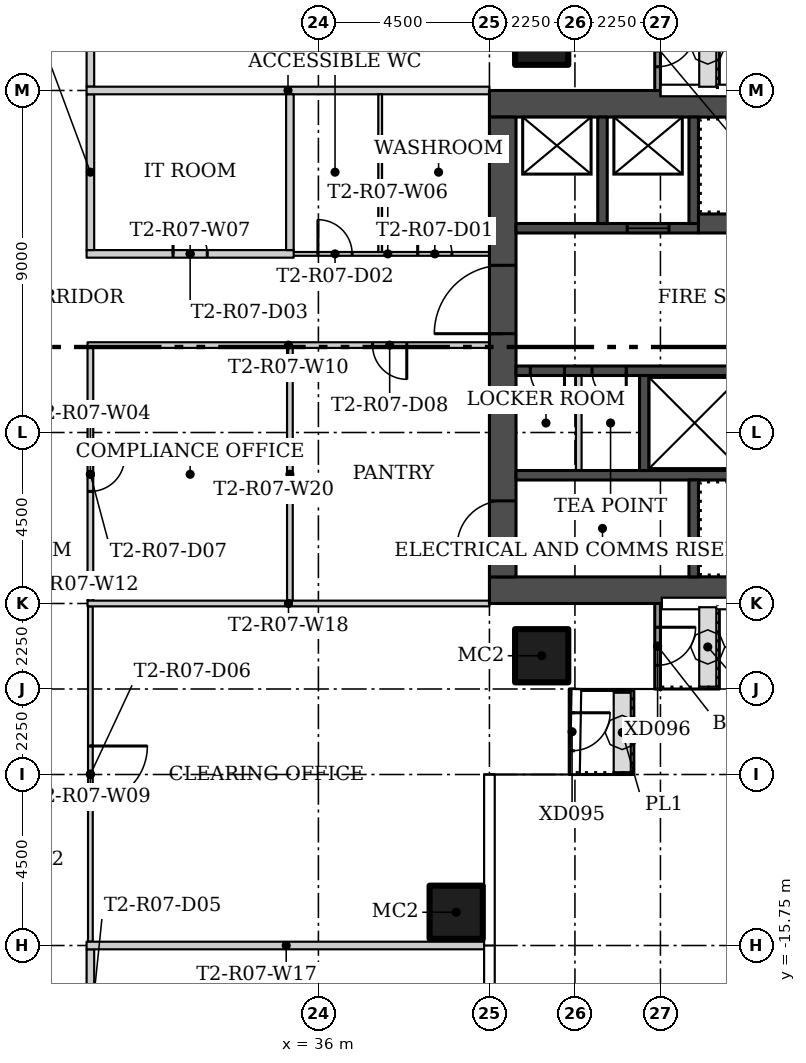
"""IFC4 building model, lengths in metres.
Left out: names, types, materials, properties, quantities, classifications, styles, units other than length and angle.
Written with IfcOpenShell. Run it as: python <this file> out.ifc"""

import sys

from ifc_helpers import new_model, si_unit, direction, frame, frame_2d, origin, origin_2d, place, context, subcontext, project, spatial, rectangle, hollow_rectangle, extrude, element, fill, save


model = new_model("IFC4")
c1 = context("Model", 3, precision=1e-05, world=origin(), true_north=direction((0.0, 1.0)))
c2 = subcontext(c1, "Body", "Model", "MODEL_VIEW")
j1 = project(units=[si_unit("LENGTHUNIT", "METRE"), si_unit("PLANEANGLEUNIT", "RADIAN")], contexts=[c1])
p1 = place(None, origin())
s1 = spatial("IfcSite", under=j1, at=p1, CompositionType="ELEMENT")
p2 = place(p1, origin())
s2 = spatial("IfcBuilding", under=s1, at=p2, CompositionType="ELEMENT")
p3 = place(p2, frame((0.0, 0.0, 69.3)))
s3 = spatial("IfcBuildingStorey", under=s2, at=p3, CompositionType="ELEMENT", Elevation=69.3)
for number, where in (
    (1, (41.875, 8.125, 0.0)),
    (2, (41.875, -8.125, 0.0)),
    (3, (39.625, -14.875, 0.0)),
):
    element("IfcColumn", number, at=place(p3, frame(where)), inside=s3, PredefinedType="COLUMN", context=c2, shape_type="SweptSolid", body=[
        extrude(hollow_rectangle(XDim=1.4, YDim=1.4, WallThickness=0.05, at=origin_2d()), origin(), (0.0, 0.0, 1.0), 3.55),
    ])
p4 = place(p3, frame((30.0, -15.85, 0.0), z_axis=(0.0, 0.0, 1.0), x_axis=(0.0, -1.0, 0.0)))
e4 = element("IfcWall", 4, at=p4, inside=s3, PredefinedType="PARTITIONING", context=c2, shape_type="SweptSolid", body=[
    extrude(rectangle(XDim=4.3, YDim=0.2, at=frame_2d((2.15, 0.0))), origin(), (0.0, 0.0, 1.0), 3.55),
])
p5 = place(p4, frame((1.4, 0.0, 0.0)))
e5 = element("IfcOpeningElement", 5, at=p5, cuts=e4, PredefinedType="OPENING", context=c2, shape_type="SweptSolid", body=[
    extrude(rectangle(XDim=1.5, YDim=2.1, at=frame_2d((0.75, 1.05))), frame((0.0, 0.11, 0.0), z_axis=(0.0, -1.0, 0.0), x_axis=(1.0, 0.0, 0.0)), (0.0, 0.0, 1.0), 0.22),
])
p6 = place(p3, frame((30.0, 20.15, 0.0), z_axis=(0.0, 0.0, 1.0), x_axis=(0.0, -1.0, 0.0)))
e6 = element("IfcWall", 6, at=p6, inside=s3, PredefinedType="PARTITIONING", context=c2, shape_type="SweptSolid", body=[
    extrude(rectangle(XDim=13.3, YDim=0.2, at=frame_2d((6.65, 0.0))), origin(), (0.0, 0.0, 1.0), 3.55),
])
p7 = place(p6, frame((5.9, 0.0, 0.0)))
e7 = element("IfcOpeningElement", 7, at=p7, cuts=e6, PredefinedType="OPENING", context=c2, shape_type="SweptSolid", body=[
    extrude(rectangle(XDim=1.5, YDim=2.1, at=frame_2d((0.75, 1.05))), frame((0.0, 0.11, 0.0), z_axis=(0.0, -1.0, 0.0), x_axis=(1.0, 0.0, 0.0)), (0.0, 0.0, 1.0), 0.22),
])
p8 = place(p3, frame((30.0, -0.025, 0.0), z_axis=(0.0, 0.0, 1.0), x_axis=(0.0, -1.0, 0.0)))
e8 = element("IfcWall", 8, at=p8, inside=s3, PredefinedType="PARTITIONING", context=c2, shape_type="SweptSolid", body=[
    extrude(rectangle(XDim=6.65, YDim=0.15, at=frame_2d((3.325, 0.0))), origin(), (0.0, 0.0, 1.0), 3.55),
])
p9 = place(p8, frame((2.875, 0.0, 0.0)))
e9 = element("IfcOpeningElement", 9, at=p9, cuts=e8, PredefinedType="OPENING", context=c2, shape_type="SweptSolid", body=[
    extrude(rectangle(XDim=0.9, YDim=2.1, at=frame_2d((0.45, 1.05))), frame((0.0, 0.085, 0.0), z_axis=(0.0, -1.0, 0.0), x_axis=(1.0, 0.0, 0.0)), (0.0, 0.0, 1.0), 0.17),
])
p10 = place(p3, frame((35.15, 2.45, 0.0)))
e10 = element("IfcWall", 10, at=p10, inside=s3, PredefinedType="PARTITIONING", context=c2, shape_type="SweptSolid", body=[
    extrude(rectangle(XDim=5.35, YDim=0.1, at=frame_2d((2.675, 0.0))), origin(), (0.0, 0.0, 1.0), 3.55),
])
p11 = place(p10, frame((3.462, 0.0, 0.0)))
e11 = element("IfcOpeningElement", 11, at=p11, cuts=e10, PredefinedType="OPENING", context=c2, shape_type="SweptSolid", body=[
    extrude(rectangle(XDim=0.9, YDim=2.1, at=frame_2d((0.45, 1.05))), frame((0.0, 0.06, 0.0), z_axis=(0.0, -1.0, 0.0), x_axis=(1.0, 0.0, 0.0)), (0.0, 0.0, 1.0), 0.12),
])
p12 = place(p10, frame((0.837, 0.0, 0.0)))
e12 = element("IfcOpeningElement", 12, at=p12, cuts=e10, PredefinedType="OPENING", context=c2, shape_type="SweptSolid", body=[
    extrude(rectangle(XDim=0.9, YDim=2.1, at=frame_2d((0.45, 1.05))), frame((0.0, 0.06, 0.0), z_axis=(0.0, -1.0, 0.0), x_axis=(1.0, 0.0, 0.0)), (0.0, 0.0, 1.0), 0.12),
])
p13 = place(p3, frame((29.9, 2.45, 0.0)))
e13 = element("IfcWall", 13, at=p13, inside=s3, PredefinedType="PARTITIONING", context=c2, shape_type="SweptSolid", body=[
    extrude(rectangle(XDim=5.45, YDim=0.2, at=frame_2d((2.725, 0.0))), origin(), (0.0, 0.0, 1.0), 3.55),
])
p14 = place(p13, frame((2.275, 0.0, 0.0)))
e14 = element("IfcOpeningElement", 14, at=p14, cuts=e13, PredefinedType="OPENING", context=c2, shape_type="SweptSolid", body=[
    extrude(rectangle(XDim=0.9, YDim=2.1, at=frame_2d((0.45, 1.05))), frame((0.0, 0.11, 0.0), z_axis=(0.0, -1.0, 0.0), x_axis=(1.0, 0.0, 0.0)), (0.0, 0.0, 1.0), 0.22),
])
p15 = place(p3, frame((30.0, 6.65, 0.0), z_axis=(0.0, 0.0, 1.0), x_axis=(0.0, -1.0, 0.0)))
e15 = element("IfcWall", 15, at=p15, inside=s3, PredefinedType="PARTITIONING", context=c2, shape_type="SweptSolid", body=[
    extrude(rectangle(XDim=4.1, YDim=0.2, at=frame_2d((2.05, 0.0))), origin(), (0.0, 0.0, 1.0), 3.55),
])
p16 = place(p3, frame((30.0, -6.825, 0.0), z_axis=(0.0, 0.0, 1.0), x_axis=(0.0, -1.0, 0.0)))
e16 = element("IfcWall", 16, at=p16, inside=s3, PredefinedType="PARTITIONING", context=c2, shape_type="SweptSolid", body=[
    extrude(rectangle(XDim=8.825, YDim=0.125, at=frame_2d((4.413, 0.0))), origin(), (0.0, 0.0, 1.0), 3.55),
])
p17 = place(p16, frame((3.675, 0.0, 0.0)))
e17 = element("IfcOpeningElement", 17, at=p17, cuts=e16, PredefinedType="OPENING", context=c2, shape_type="SweptSolid", body=[
    extrude(rectangle(XDim=1.5, YDim=2.1, at=frame_2d((0.75, 1.05))), frame((0.0, 0.073, 0.0), z_axis=(0.0, -1.0, 0.0), x_axis=(1.0, 0.0, 0.0)), (0.0, 0.0, 1.0), 0.145),
])
p18 = place(p3, frame((40.5, 0.05, 0.0), z_axis=(0.0, 0.0, 1.0), x_axis=(-1.0, 0.0, 0.0)))
e18 = element("IfcWall", 18, at=p18, inside=s3, PredefinedType="PARTITIONING", context=c2, shape_type="SweptSolid", body=[
    extrude(rectangle(XDim=10.575, YDim=0.15, at=frame_2d((5.288, 0.0))), origin(), (0.0, 0.0, 1.0), 3.55),
])
p19 = place(p18, frame((2.175, 0.0, 0.0)))
e19 = element("IfcOpeningElement", 19, at=p19, cuts=e18, PredefinedType="OPENING", context=c2, shape_type="SweptSolid", body=[
    extrude(rectangle(XDim=0.9, YDim=2.1, at=frame_2d((0.45, 1.05))), frame((0.0, 0.085, 0.0), z_axis=(0.0, -1.0, 0.0), x_axis=(1.0, 0.0, 0.0)), (0.0, 0.0, 1.0), 0.17),
])
p20 = place(p3, frame((29.9, 6.75, 0.0)))
e20 = element("IfcWall", 20, at=p20, inside=s3, PredefinedType="PARTITIONING", context=c2, shape_type="SweptSolid", body=[
    extrude(rectangle(XDim=10.6, YDim=0.2, at=frame_2d((5.3, 0.0))), origin(), (0.0, 0.0, 1.0), 3.55),
])
p21 = place(p3, frame((37.625, 6.65, 0.0), z_axis=(0.0, 0.0, 1.0), x_axis=(0.0, -1.0, 0.0)))
e21 = element("IfcWall", 21, at=p21, inside=s3, PredefinedType="PARTITIONING", context=c2, shape_type="SweptSolid", body=[
    extrude(rectangle(XDim=4.15, YDim=0.1, at=frame_2d((2.075, 0.0))), origin(), (0.0, 0.0, 1.0), 3.55),
])
p22 = place(p3, frame((35.25, 6.65, 0.0), z_axis=(0.0, 0.0, 1.0), x_axis=(0.0, -1.0, 0.0)))
e22 = element("IfcWall", 22, at=p22, inside=s3, PredefinedType="PARTITIONING", context=c2, shape_type="SweptSolid", body=[
    extrude(rectangle(XDim=4.1, YDim=0.2, at=frame_2d((2.05, 0.0))), origin(), (0.0, 0.0, 1.0), 3.55),
])
p23 = place(p3, frame((29.9, -15.75, 0.0)))
e23 = element("IfcWall", 23, at=p23, inside=s3, PredefinedType="PARTITIONING", context=c2, shape_type="SweptSolid", body=[
    extrude(rectangle(XDim=10.505, YDim=0.2, at=frame_2d((5.252, 0.0))), origin(), (0.0, 0.0, 1.0), 3.55),
])
p24 = place(p3, frame((40.5, -6.75, 0.0), z_axis=(0.0, 0.0, 1.0), x_axis=(-1.0, 0.0, 0.0)))
e24 = element("IfcWall", 24, at=p24, inside=s3, PredefinedType="PARTITIONING", context=c2, shape_type="SweptSolid", body=[
    extrude(rectangle(XDim=10.575, YDim=0.15, at=frame_2d((5.288, 0.0))), origin(), (0.0, 0.0, 1.0), 3.55),
])
p25 = place(p3, frame((35.25, -0.025, 0.0), z_axis=(0.0, 0.0, 1.0), x_axis=(0.0, -1.0, 0.0)))
e25 = element("IfcWall", 25, at=p25, inside=s3, PredefinedType="PARTITIONING", context=c2, shape_type="SweptSolid", body=[
    extrude(rectangle(XDim=6.65, YDim=0.15, at=frame_2d((3.325, 0.0))), origin(), (0.0, 0.0, 1.0), 3.55),
])
p26 = place(p3, frame((44.925, 9.0, 0.0), z_axis=(0.0, 0.0, 1.0), x_axis=(0.0, -1.0, 0.0)))
e26 = element("IfcWall", 26, at=p26, inside=s3, PredefinedType="SOLIDWALL", context=c2, shape_type="SweptSolid", body=[
    extrude(rectangle(XDim=2.257, YDim=0.15, at=frame_2d((1.128, 0.0))), origin(), (0.0, 0.0, 1.0), 3.45),
])
p27 = place(p26, frame((0.625, 0.0, 0.0)))
e27 = element("IfcOpeningElement", 27, at=p27, cuts=e26, PredefinedType="OPENING", context=c2, shape_type="SweptSolid", body=[
    extrude(rectangle(XDim=1.0, YDim=2.4, at=frame_2d((0.5, 1.2))), frame((0.0, 0.085, 0.0), z_axis=(0.0, -1.0, 0.0), x_axis=(1.0, 0.0, 0.0)), (0.0, 0.0, 1.0), 0.17),
])
p28 = place(p3, frame((42.675, -9.0, 0.0), z_axis=(0.0, 0.0, 1.0), x_axis=(0.0, -1.0, 0.0)))
e28 = element("IfcWall", 28, at=p28, inside=s3, PredefinedType="SOLIDWALL", context=c2, shape_type="SweptSolid", body=[
    extrude(rectangle(XDim=2.25, YDim=0.15, at=frame_2d((1.125, 0.0))), origin(), (0.0, 0.0, 1.0), 3.45),
])
p29 = place(p28, frame((0.625, 0.0, 0.0)))
e29 = element("IfcOpeningElement", 29, at=p29, cuts=e28, PredefinedType="OPENING", context=c2, shape_type="SweptSolid", body=[
    extrude(rectangle(XDim=1.0, YDim=2.4, at=frame_2d((0.5, 1.2))), frame((0.0, 0.085, 0.0), z_axis=(0.0, -1.0, 0.0), x_axis=(1.0, 0.0, 0.0)), (0.0, 0.0, 1.0), 0.17),
])
p30 = place(p3, frame((44.925, -6.743, 0.0), z_axis=(0.0, 0.0, 1.0), x_axis=(0.0, -1.0, 0.0)))
e30 = element("IfcWall", 30, at=p30, inside=s3, PredefinedType="SOLIDWALL", context=c2, shape_type="SweptSolid", body=[
    extrude(rectangle(XDim=2.257, YDim=0.15, at=frame_2d((1.128, 0.0))), origin(), (0.0, 0.0, 1.0), 3.45),
])
p31 = place(p30, frame((0.632, 0.0, 0.0)))
e31 = element("IfcOpeningElement", 31, at=p31, cuts=e30, PredefinedType="OPENING", context=c2, shape_type="SweptSolid", body=[
    extrude(rectangle(XDim=1.0, YDim=2.4, at=frame_2d((0.5, 1.2))), frame((0.0, 0.085, 0.0), z_axis=(0.0, -1.0, 0.0), x_axis=(1.0, 0.0, 0.0)), (0.0, 0.0, 1.0), 0.17),
])
for number, where, z_axis, x_axis in (
    (32, (54.0, -6.4, 0.0), (0.0, 0.0, 1.0), (-1.0, 0.0, 0.0)),
    (33, (54.0, 6.4, 0.0), (0.0, 0.0, 1.0), (-1.0, 0.0, 0.0)),
):
    element("IfcWall", number, at=place(p3, frame(where, z_axis=z_axis, x_axis=x_axis)), inside=s3, PredefinedType="SHEAR", context=c2, shape_type="SweptSolid", body=[
        extrude(rectangle(XDim=13.5, YDim=0.7, at=frame_2d((6.75, 0.0))), origin(), (0.0, 0.0, 1.0), 3.55),
    ])
p32 = place(p3, frame((40.85, -6.05, 0.0), z_axis=(0.0, 0.0, 1.0), x_axis=(0.0, 1.0, 0.0)))
e34 = element("IfcWall", 34, at=p32, inside=s3, PredefinedType="SHEAR", context=c2, shape_type="SweptSolid", body=[
    extrude(rectangle(XDim=12.1, YDim=0.7, at=frame_2d((6.05, 0.0))), origin(), (0.0, 0.0, 1.0), 3.55),
])
p33 = place(p32, frame((0.8, 0.0, 0.0)))
e35 = element("IfcOpeningElement", 35, at=p33, cuts=e34, PredefinedType="OPENING", context=c2, shape_type="SweptSolid", body=[
    extrude(rectangle(XDim=1.2, YDim=2.1, at=frame_2d((0.6, 1.05))), frame((0.0, 0.36, 0.0), z_axis=(0.0, -1.0, 0.0), x_axis=(1.0, 0.0, 0.0)), (0.0, 0.0, 1.0), 0.72),
])
p34 = place(p32, frame((6.4, 0.0, 0.0)))
e36 = element("IfcOpeningElement", 36, at=p34, cuts=e34, PredefinedType="OPENING", context=c2, shape_type="SweptSolid", body=[
    extrude(rectangle(XDim=1.8, YDim=2.4, at=frame_2d((0.9, 1.2))), frame((0.0, 0.36, 0.0), z_axis=(0.0, -1.0, 0.0), x_axis=(1.0, 0.0, 0.0)), (0.0, 0.0, 1.0), 0.72),
])
p35 = place(p3, frame((53.3, -3.375, 0.0), z_axis=(0.0, 0.0, 1.0), x_axis=(-1.0, 0.0, 0.0)))
e37 = element("IfcWall", 37, at=p35, inside=s3, PredefinedType="SHEAR", context=c2, shape_type="SweptSolid", body=[
    extrude(rectangle(XDim=12.1, YDim=0.25, at=frame_2d((6.05, 0.0))), origin(), (0.0, 0.0, 1.0), 3.55),
])
p36 = place(p35, frame((0.05, 0.0, 0.0)))
e38 = element("IfcOpeningElement", 38, at=p36, cuts=e37, PredefinedType="OPENING", context=c2, shape_type="SweptSolid", body=[
    extrude(rectangle(XDim=1.1, YDim=2.1, at=frame_2d((0.55, 1.05))), frame((0.0, 0.135, 0.0), z_axis=(0.0, -1.0, 0.0), x_axis=(1.0, 0.0, 0.0)), (0.0, 0.0, 1.0), 0.27),
])
p37 = place(p3, frame((45.875, -6.05, 0.0), z_axis=(0.0, 0.0, 1.0), x_axis=(0.0, 1.0, 0.0)))
e39 = element("IfcWall", 39, at=p37, inside=s3, PredefinedType="SHEAR", context=c2, shape_type="SweptSolid", body=[
    extrude(rectangle(XDim=2.55, YDim=0.25, at=frame_2d((1.275, 0.0))), origin(), (0.0, 0.0, 1.0), 3.55),
])
p38 = place(p3, frame((53.3, -0.625, 0.0), z_axis=(0.0, 0.0, 1.0), x_axis=(-1.0, 0.0, 0.0)))
e40 = element("IfcWall", 40, at=p38, inside=s3, PredefinedType="SHEAR", context=c2, shape_type="SweptSolid", body=[
    extrude(rectangle(XDim=12.1, YDim=0.25, at=frame_2d((6.05, 0.0))), origin(), (0.0, 0.0, 1.0), 3.55),
])
p39 = place(p38, frame((2.25, 0.0, 0.0)))
e41 = element("IfcOpeningElement", 41, at=p39, cuts=e40, PredefinedType="OPENING", context=c2, shape_type="SweptSolid", body=[
    extrude(rectangle(XDim=1.2, YDim=2.1, at=frame_2d((0.6, 1.05))), frame((0.0, 0.135, 0.0), z_axis=(0.0, -1.0, 0.0), x_axis=(1.0, 0.0, 0.0)), (0.0, 0.0, 1.0), 0.27),
])
p40 = place(p38, frame((9.2, 0.0, 0.0)))
e42 = element("IfcOpeningElement", 42, at=p40, cuts=e40, PredefinedType="OPENING", context=c2, shape_type="SweptSolid", body=[
    extrude(rectangle(XDim=0.9, YDim=2.1, at=frame_2d((0.45, 1.05))), frame((0.0, 0.135, 0.0), z_axis=(0.0, -1.0, 0.0), x_axis=(1.0, 0.0, 0.0)), (0.0, 0.0, 1.0), 0.27),
])
p41 = place(p38, frame((10.825, 0.0, 0.0)))
e43 = element("IfcOpeningElement", 43, at=p41, cuts=e40, PredefinedType="OPENING", context=c2, shape_type="SweptSolid", body=[
    extrude(rectangle(XDim=0.9, YDim=2.1, at=frame_2d((0.45, 1.05))), frame((0.0, 0.135, 0.0), z_axis=(0.0, -1.0, 0.0), x_axis=(1.0, 0.0, 0.0)), (0.0, 0.0, 1.0), 0.27),
])
p42 = place(p3, frame((44.575, -3.25, 0.0), z_axis=(0.0, 0.0, 1.0), x_axis=(0.0, 1.0, 0.0)))
e44 = element("IfcWall", 44, at=p42, inside=s3, PredefinedType="SHEAR", context=c2, shape_type="SweptSolid", body=[
    extrude(rectangle(XDim=2.5, YDim=0.25, at=frame_2d((1.25, 0.0))), origin(), (0.0, 0.0, 1.0), 3.55),
])
p43 = place(p3, frame((42.85, -3.25, 0.0), z_axis=(0.0, 0.0, 1.0), x_axis=(0.0, 1.0, 0.0)))
e45 = element("IfcWall", 45, at=p43, inside=s3, PredefinedType="PARTITIONING", context=c2, shape_type="SweptSolid", body=[
    extrude(rectangle(XDim=2.5, YDim=0.15, at=frame_2d((1.25, 0.0))), origin(), (0.0, 0.0, 1.0), 3.55),
])
p44 = place(p3, frame((46.0, 3.25, 0.0)))
e46 = element("IfcWall", 46, at=p44, inside=s3, PredefinedType="SHEAR", context=c2, shape_type="SweptSolid", body=[
    extrude(rectangle(XDim=7.3, YDim=0.5, at=frame_2d((3.65, 0.0))), origin(), (0.0, 0.0, 1.0), 3.55),
])
p45 = place(p44, frame((6.15, 0.0, 0.0)))
e47 = element("IfcOpeningElement", 47, at=p45, cuts=e46, PredefinedType="OPENING", context=c2, shape_type="SweptSolid", body=[
    extrude(rectangle(XDim=1.1, YDim=2.1, at=frame_2d((0.55, 1.05))), frame((0.0, 0.26, 0.0), z_axis=(0.0, -1.0, 0.0), x_axis=(1.0, 0.0, 0.0)), (0.0, 0.0, 1.0), 0.52),
])
p46 = place(p3, frame((46.0, 3.125, 0.0), z_axis=(0.0, 0.0, 1.0), x_axis=(-1.0, 0.0, 0.0)))
e48 = element("IfcWall", 48, at=p46, inside=s3, PredefinedType="SHEAR", context=c2, shape_type="SweptSolid", body=[
    extrude(rectangle(XDim=4.8, YDim=0.25, at=frame_2d((2.4, 0.0))), origin(), (0.0, 0.0, 1.0), 3.55),
])
p47 = place(p46, frame((0.775, 0.0, 0.0)))
e49 = element("IfcOpeningElement", 49, at=p47, cuts=e48, PredefinedType="OPENING", context=c2, shape_type="SweptSolid", body=[
    extrude(rectangle(XDim=1.1, YDim=2.1, at=frame_2d((0.55, 1.05))), frame((0.0, 0.135, 0.0), z_axis=(0.0, -1.0, 0.0), x_axis=(1.0, 0.0, 0.0)), (0.0, 0.0, 1.0), 0.27),
])
for number, where, z_axis, x_axis in (
    (50, (45.875, 3.25, 0.0), (0.0, 0.0, 1.0), (0.0, 1.0, 0.0)),
    (51, (43.475, 3.25, 0.0), (0.0, 0.0, 1.0), (0.0, 1.0, 0.0)),
):
    element("IfcWall", number, at=place(p3, frame(where, z_axis=z_axis, x_axis=x_axis)), inside=s3, PredefinedType="SHEAR", context=c2, shape_type="SweptSolid", body=[
        extrude(rectangle(XDim=2.8, YDim=0.25, at=frame_2d((1.4, 0.0))), origin(), (0.0, 0.0, 1.0), 3.55),
    ])
p48 = place(p11, origin())
e52 = element("IfcDoor", 52, at=p48, inside=s3, OperationType="SINGLE_SWING_RIGHT", PredefinedType="DOOR", context=c2, shape_type="SweptSolid", body=[
    extrude(rectangle(XDim=0.9, YDim=2.1, at=frame_2d((0.45, 1.05))), frame((0.0, 0.025, 0.0), z_axis=(0.0, -1.0, 0.0), x_axis=(1.0, 0.0, 0.0)), (0.0, 0.0, 1.0), 0.05),
])
fill(e11, e52)
p49 = place(p12, origin())
e53 = element("IfcDoor", 53, at=p49, inside=s3, OperationType="SINGLE_SWING_LEFT", PredefinedType="DOOR", context=c2, shape_type="SweptSolid", body=[
    extrude(rectangle(XDim=0.9, YDim=2.1, at=frame_2d((0.45, 1.05))), frame((0.0, 0.025, 0.0), z_axis=(0.0, -1.0, 0.0), x_axis=(1.0, 0.0, 0.0)), (0.0, 0.0, 1.0), 0.05),
])
fill(e12, e53)
p50 = place(p14, origin())
e54 = element("IfcDoor", 54, at=p50, inside=s3, OperationType="SINGLE_SWING_LEFT", PredefinedType="DOOR", context=c2, shape_type="SweptSolid", body=[
    extrude(rectangle(XDim=0.9, YDim=2.1, at=frame_2d((0.45, 1.05))), frame((0.0, 0.025, 0.0), z_axis=(0.0, -1.0, 0.0), x_axis=(1.0, 0.0, 0.0)), (0.0, 0.0, 1.0), 0.05),
])
fill(e14, e54)
p51 = place(p17, origin())
e55 = element("IfcDoor", 55, at=p51, inside=s3, OperationType="DOUBLE_DOOR_SINGLE_SWING", PredefinedType="DOOR", context=c2, shape_type="SweptSolid", body=[
    extrude(rectangle(XDim=1.5, YDim=2.1, at=frame_2d((0.75, 1.05))), frame((0.0, 0.025, 0.0), z_axis=(0.0, -1.0, 0.0), x_axis=(1.0, 0.0, 0.0)), (0.0, 0.0, 1.0), 0.05),
])
fill(e17, e55)
p52 = place(p9, origin())
e56 = element("IfcDoor", 56, at=p52, inside=s3, OperationType="SINGLE_SWING_LEFT", PredefinedType="DOOR", context=c2, shape_type="SweptSolid", body=[
    extrude(rectangle(XDim=0.9, YDim=2.1, at=frame_2d((0.45, 1.05))), frame((0.0, 0.025, 0.0), z_axis=(0.0, -1.0, 0.0), x_axis=(1.0, 0.0, 0.0)), (0.0, 0.0, 1.0), 0.05),
])
fill(e9, e56)
p53 = place(p19, origin())
e57 = element("IfcDoor", 57, at=p53, inside=s3, OperationType="SINGLE_SWING_RIGHT", PredefinedType="DOOR", context=c2, shape_type="SweptSolid", body=[
    extrude(rectangle(XDim=0.9, YDim=2.1, at=frame_2d((0.45, 1.05))), frame((0.0, 0.025, 0.0), z_axis=(0.0, -1.0, 0.0), x_axis=(1.0, 0.0, 0.0)), (0.0, 0.0, 1.0), 0.05),
])
fill(e19, e57)
p54 = place(p27, origin())
e58 = element("IfcDoor", 58, at=p54, inside=s3, OperationType="SINGLE_SWING_LEFT", PredefinedType="DOOR", context=c2, shape_type="SweptSolid", body=[
    extrude(rectangle(XDim=1.0, YDim=2.4, at=frame_2d((0.5, 1.2))), frame((0.0, 0.025, 0.0), z_axis=(0.0, -1.0, 0.0), x_axis=(1.0, 0.0, 0.0)), (0.0, 0.0, 1.0), 0.05),
])
fill(e27, e58)
p55 = place(p29, origin())
e59 = element("IfcDoor", 59, at=p55, inside=s3, OperationType="SINGLE_SWING_LEFT", PredefinedType="DOOR", context=c2, shape_type="SweptSolid", body=[
    extrude(rectangle(XDim=1.0, YDim=2.4, at=frame_2d((0.5, 1.2))), frame((0.0, 0.025, 0.0), z_axis=(0.0, -1.0, 0.0), x_axis=(1.0, 0.0, 0.0)), (0.0, 0.0, 1.0), 0.05),
])
fill(e29, e59)
p56 = place(p31, origin())
e60 = element("IfcDoor", 60, at=p56, inside=s3, OperationType="SINGLE_SWING_RIGHT", PredefinedType="DOOR", context=c2, shape_type="SweptSolid", body=[
    extrude(rectangle(XDim=1.0, YDim=2.4, at=frame_2d((0.5, 1.2))), frame((0.0, 0.025, 0.0), z_axis=(0.0, -1.0, 0.0), x_axis=(1.0, 0.0, 0.0)), (0.0, 0.0, 1.0), 0.05),
])
fill(e31, e60)
p57 = place(p33, origin())
e61 = element("IfcDoor", 61, at=p57, inside=s3, OperationType="SINGLE_SWING_LEFT", PredefinedType="DOOR", context=c2, shape_type="SweptSolid", body=[
    extrude(rectangle(XDim=1.2, YDim=2.1, at=frame_2d((0.6, 1.05))), frame((0.0, 0.025, 0.0), z_axis=(0.0, -1.0, 0.0), x_axis=(1.0, 0.0, 0.0)), (0.0, 0.0, 1.0), 0.05),
])
fill(e35, e61)
p58 = place(p34, origin())
e62 = element("IfcDoor", 62, at=p58, inside=s3, OperationType="DOUBLE_DOOR_SINGLE_SWING", PredefinedType="DOOR", context=c2, shape_type="SweptSolid", body=[
    extrude(rectangle(XDim=1.8, YDim=2.4, at=frame_2d((0.9, 1.2))), frame((0.0, 0.025, 0.0), z_axis=(0.0, -1.0, 0.0), x_axis=(1.0, 0.0, 0.0)), (0.0, 0.0, 1.0), 0.05),
])
fill(e36, e62)
p59 = place(p40, origin())
e63 = element("IfcDoor", 63, at=p59, inside=s3, OperationType="SINGLE_SWING_RIGHT", PredefinedType="DOOR", context=c2, shape_type="SweptSolid", body=[
    extrude(rectangle(XDim=0.9, YDim=2.1, at=frame_2d((0.45, 1.05))), frame((0.0, 0.025, 0.0), z_axis=(0.0, -1.0, 0.0), x_axis=(1.0, 0.0, 0.0)), (0.0, 0.0, 1.0), 0.05),
])
fill(e42, e63)
p60 = place(p41, origin())
e64 = element("IfcDoor", 64, at=p60, inside=s3, OperationType="SINGLE_SWING_RIGHT", PredefinedType="DOOR", context=c2, shape_type="SweptSolid", body=[
    extrude(rectangle(XDim=0.9, YDim=2.1, at=frame_2d((0.45, 1.05))), frame((0.0, 0.025, 0.0), z_axis=(0.0, -1.0, 0.0), x_axis=(1.0, 0.0, 0.0)), (0.0, 0.0, 1.0), 0.05),
])
fill(e43, e64)
p61 = place(p47, origin())
e65 = element("IfcDoor", 65, at=p61, inside=s3, OperationType="SLIDING_TO_LEFT", PredefinedType="DOOR", context=c2, shape_type="SweptSolid", body=[
    extrude(rectangle(XDim=1.1, YDim=2.1, at=frame_2d((0.55, 1.05))), frame((0.0, 0.025, 0.0), z_axis=(0.0, -1.0, 0.0), x_axis=(1.0, 0.0, 0.0)), (0.0, 0.0, 1.0), 0.05),
])
fill(e49, e65)
save(model, sys.argv[1])
